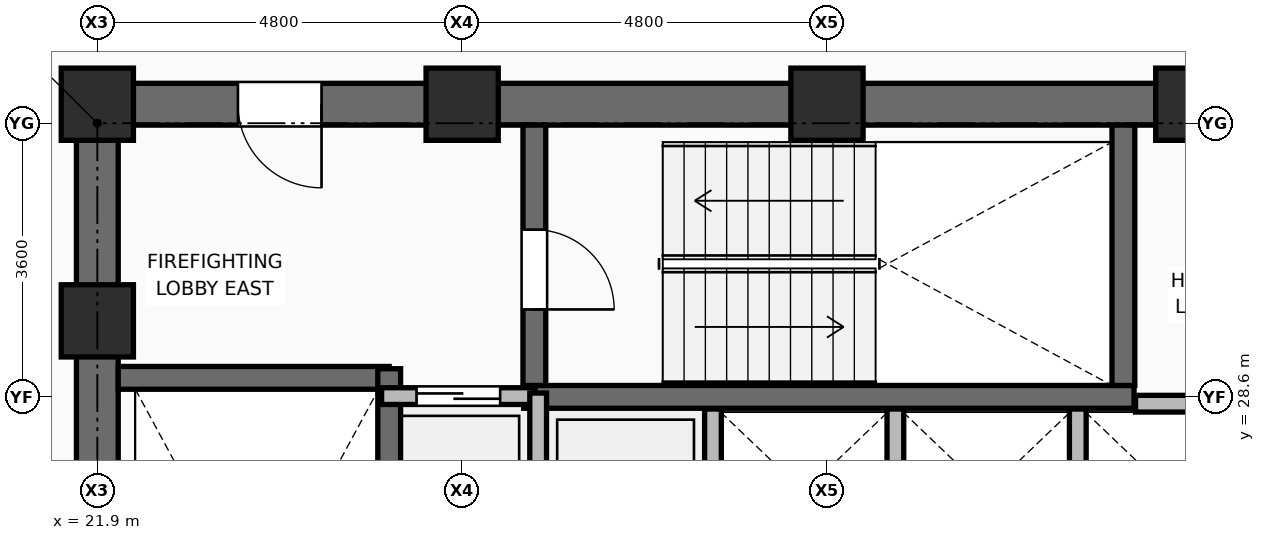
"""IFC4 building model, lengths in metres.
Left out: names, types, materials, properties, quantities, classifications, styles, units other than length and angle.
Written with IfcOpenShell. Run it as: python <this file> out.ifc"""

import sys

from ifc_helpers import new_model, si_unit, direction, frame, frame_2d, origin, origin_2d, place, context, subcontext, project, spatial, rectangle, extrude, element, fill, save


model = new_model("IFC4")
c1 = context("Model", 3, precision=1e-05, world=origin(), true_north=direction((0.0, 1.0)))
c2 = subcontext(c1, "Body", "Model", "MODEL_VIEW")
j1 = project(units=[si_unit("LENGTHUNIT", "METRE"), si_unit("PLANEANGLEUNIT", "RADIAN")], contexts=[c1])
p1 = place(None, origin())
s1 = spatial("IfcSite", under=j1, at=p1, CompositionType="ELEMENT")
p2 = place(p1, origin())
s2 = spatial("IfcBuilding", under=s1, at=p2, CompositionType="ELEMENT")
p3 = place(p2, frame((0.0, 0.0, 172.2)))
s3 = spatial("IfcBuildingStorey", under=s2, at=p3, CompositionType="ELEMENT", Elevation=172.2)
for number, where, z_axis, x_axis in (
    (1, (21.9, 29.6, 0.0), (0.0, 0.0, 1.0), (1.0, 0.0, 0.0)),
    (2, (21.9, 32.45, 0.0), (0.0, 0.0, 1.0), (1.0, 0.0, 0.0)),
    (3, (26.7, 32.45, 0.0), (0.0, 0.0, 1.0), (1.0, 0.0, 0.0)),
    (4, (31.5, 32.45, 0.0), (0.0, 0.0, 1.0), (1.0, 0.0, 0.0)),
    (5, (36.3, 32.45, 0.0), (0.0, 0.0, 1.0), (1.0, 0.0, 0.0)),
):
    element("IfcColumn", number, at=place(p3, frame(where, z_axis=z_axis, x_axis=x_axis)), inside=s3, PredefinedType="COLUMN", context=c2, shape_type="SweptSolid", body=[
        extrude(rectangle(XDim=0.95, YDim=0.95, at=origin_2d()), origin(), (0.0, 0.0, 1.0), 3.75),
    ])
p4 = place(p3, frame((30.0, 25.71, 0.0), z_axis=(0.0, 0.0, 1.0), x_axis=(0.0, 1.0, 0.0)))
e6 = element("IfcWall", 6, at=p4, inside=s3, PredefinedType="PARTITIONING", context=c2, shape_type="SweptSolid", body=[
    extrude(rectangle(XDim=2.73, YDim=0.22, at=frame_2d((1.365, 0.0))), origin(), (0.0, 0.0, 1.0), 3.475),
])
p5 = place(p3, frame((32.4, 26.2, 0.0), z_axis=(0.0, 0.0, 1.0), x_axis=(0.0, 1.0, 0.0)))
e7 = element("IfcWall", 7, at=p5, inside=s3, PredefinedType="PARTITIONING", context=c2, shape_type="SweptSolid", body=[
    extrude(rectangle(XDim=2.24, YDim=0.22, at=frame_2d((1.12, 0.0))), origin(), (0.0, 0.0, 1.0), 3.475),
])
p6 = place(p3, frame((34.8, 26.23, 0.0), z_axis=(0.0, 0.0, 1.0), x_axis=(0.0, 1.0, 0.0)))
e8 = element("IfcWall", 8, at=p6, inside=s3, PredefinedType="PARTITIONING", context=c2, shape_type="SweptSolid", body=[
    extrude(rectangle(XDim=2.21, YDim=0.22, at=frame_2d((1.105, 0.0))), origin(), (0.0, 0.0, 1.0), 3.475),
])
p7 = place(p3, frame((21.625, 32.45, 0.0), z_axis=(0.0, 0.0, 1.0), x_axis=(1.0, 0.0, 0.0)))
e9 = element("IfcWall", 9, at=p7, inside=s3, PredefinedType="SHEAR", context=c2, shape_type="SweptSolid", body=[
    extrude(rectangle(XDim=19.75, YDim=0.55, at=frame_2d((9.875, 0.0))), origin(), (0.0, 0.0, 1.0), 3.5),
])
p8 = place(p7, frame((2.125, 0.0, 0.0)))
e10 = element("IfcOpeningElement", 10, at=p8, cuts=e9, PredefinedType="OPENING", context=c2, shape_type="SweptSolid", body=[
    extrude(rectangle(XDim=1.1, YDim=2.1, at=frame_2d((0.55, 1.05))), frame((0.0, 0.285, 0.0), z_axis=(0.0, -1.0, 0.0), x_axis=(1.0, 0.0, 0.0)), (0.0, 0.0, 1.0), 0.57),
])
p9 = place(p7, frame((15.515, 0.0, 0.0)))
e11 = element("IfcOpeningElement", 11, at=p9, cuts=e9, PredefinedType="OPENING", context=c2, shape_type="SweptSolid", body=[
    extrude(rectangle(XDim=1.0, YDim=2.1, at=frame_2d((0.5, 1.05))), frame((0.0, 0.285, 0.0), z_axis=(0.0, -1.0, 0.0), x_axis=(1.0, 0.0, 0.0)), (0.0, 0.0, 1.0), 0.57),
])
p10 = place(p7, frame((17.525, 0.0, 0.0)))
e12 = element("IfcOpeningElement", 12, at=p10, cuts=e9, PredefinedType="OPENING", context=c2, shape_type="SweptSolid", body=[
    extrude(rectangle(XDim=0.9, YDim=2.1, at=frame_2d((0.45, 1.05))), frame((0.0, 0.285, 0.0), z_axis=(0.0, -1.0, 0.0), x_axis=(1.0, 0.0, 0.0)), (0.0, 0.0, 1.0), 0.57),
])
p11 = place(p3, frame((21.9, 18.075, 0.0), z_axis=(0.0, 0.0, 1.0), x_axis=(0.0, 1.0, 0.0)))
e13 = element("IfcWall", 13, at=p11, inside=s3, PredefinedType="SHEAR", context=c2, shape_type="SweptSolid", body=[
    extrude(rectangle(XDim=14.1, YDim=0.55, at=frame_2d((7.05, 0.0))), origin(), (0.0, 0.0, 1.0), 3.5),
])
p12 = place(p3, frame((22.175, 28.85, 0.0), z_axis=(0.0, 0.0, 1.0), x_axis=(1.0, 0.0, 0.0)))
e14 = element("IfcWall", 14, at=p12, inside=s3, PredefinedType="SHEAR", context=c2, shape_type="SweptSolid", body=[
    extrude(rectangle(XDim=3.565, YDim=0.3, at=frame_2d((1.782, 0.0))), origin(), (0.0, 0.0, 1.0), 3.5),
])
p13 = place(p3, frame((25.74, 20.98, 0.0), z_axis=(0.0, 0.0, 1.0), x_axis=(0.0, 1.0, 0.0)))
e15 = element("IfcWall", 15, at=p13, inside=s3, PredefinedType="SHEAR", context=c2, shape_type="SweptSolid", body=[
    extrude(rectangle(XDim=7.99, YDim=0.3, at=frame_2d((3.995, 0.0))), origin(), (0.0, 0.0, 1.0), 3.5),
])
p14 = place(p3, frame((27.51, 28.6, 0.0), z_axis=(0.0, 0.0, 1.0), x_axis=(1.0, 0.0, 0.0)))
e16 = element("IfcWall", 16, at=p14, inside=s3, PredefinedType="SHEAR", context=c2, shape_type="SweptSolid", body=[
    extrude(rectangle(XDim=8.03, YDim=0.3, at=frame_2d((4.015, 0.0))), origin(), (0.0, 0.0, 1.0), 3.5),
])
p15 = place(p3, frame((27.65, 28.75, 0.0), z_axis=(0.0, 0.0, 1.0), x_axis=(0.0, 1.0, 0.0)))
e17 = element("IfcWall", 17, at=p15, inside=s3, PredefinedType="SHEAR", context=c2, shape_type="SweptSolid", body=[
    extrude(rectangle(XDim=3.425, YDim=0.3, at=frame_2d((1.712, 0.0))), origin(), (0.0, 0.0, 1.0), 3.5),
])
p16 = place(p15, frame((1.0, 0.0, 0.0)))
e18 = element("IfcOpeningElement", 18, at=p16, cuts=e17, PredefinedType="OPENING", context=c2, shape_type="SweptSolid", body=[
    extrude(rectangle(XDim=1.05, YDim=2.1, at=frame_2d((0.525, 1.05))), frame((0.0, 0.16, 0.0), z_axis=(0.0, -1.0, 0.0), x_axis=(1.0, 0.0, 0.0)), (0.0, 0.0, 1.0), 0.32),
])
p17 = place(p3, frame((35.4, 28.75, 0.0), z_axis=(0.0, 0.0, 1.0), x_axis=(0.0, 1.0, 0.0)))
e19 = element("IfcWall", 19, at=p17, inside=s3, PredefinedType="SHEAR", context=c2, shape_type="SweptSolid", body=[
    extrude(rectangle(XDim=3.425, YDim=0.3, at=frame_2d((1.712, 0.0))), origin(), (0.0, 0.0, 1.0), 3.5),
])
p18 = place(p3, frame((25.64, 28.61, 0.0), z_axis=(0.0, 0.0, 1.0), x_axis=(1.0, 0.0, 0.0)))
e20 = element("IfcWall", 20, at=p18, inside=s3, PredefinedType="PARTITIONING", context=c2, shape_type="SweptSolid", body=[
    extrude(rectangle(XDim=2.02, YDim=0.22, at=frame_2d((1.01, 0.0))), origin(), (0.0, 0.0, 1.0), 3.48),
])
p19 = place(p18, frame((0.46, 0.0, 0.0)))
e21 = element("IfcOpeningElement", 21, at=p19, cuts=e20, PredefinedType="OPENING", context=c2, shape_type="SweptSolid", body=[
    extrude(rectangle(XDim=1.1, YDim=2.2, at=frame_2d((0.55, 1.1))), frame((0.0, 0.12, 0.0), z_axis=(0.0, -1.0, 0.0), x_axis=(1.0, 0.0, 0.0)), (0.0, 0.0, 1.0), 0.24),
])
p20 = place(p3, frame((35.56, 28.51, 0.0), z_axis=(0.0, 0.0, 1.0), x_axis=(1.0, 0.0, 0.0)))
e22 = element("IfcWall", 22, at=p20, inside=s3, PredefinedType="PARTITIONING", context=c2, shape_type="SweptSolid", body=[
    extrude(rectangle(XDim=1.6, YDim=0.22, at=frame_2d((0.8, 0.0))), origin(), (0.0, 0.0, 1.0), 3.48),
])
p21 = place(p3, frame((27.7, 25.65, 0.0), z_axis=(0.0, 0.0, 1.0), x_axis=(0.0, 1.0, 0.0)))
e23 = element("IfcWall", 23, at=p21, inside=s3, PredefinedType="PARTITIONING", context=c2, shape_type="SweptSolid", body=[
    extrude(rectangle(XDim=3.0, YDim=0.22, at=frame_2d((1.5, 0.0))), origin(), (0.0, 0.0, 1.0), 3.48),
])
p22 = place(p16, frame((1.05, 0.0, 0.0), z_axis=(0.0, 0.0, 1.0), x_axis=(-1.0, 0.0, 0.0)))
e24 = element("IfcDoor", 24, at=p22, inside=s3, OperationType="SINGLE_SWING_RIGHT", PredefinedType="DOOR", context=c2, shape_type="SweptSolid", body=[
    extrude(rectangle(XDim=1.05, YDim=2.1, at=frame_2d((0.525, 1.05))), frame((0.0, 0.025, 0.0), z_axis=(0.0, -1.0, 0.0), x_axis=(1.0, 0.0, 0.0)), (0.0, 0.0, 1.0), 0.05),
])
fill(e18, e24)
p23 = place(p19, origin())
e25 = element("IfcDoor", 25, at=p23, inside=s3, OperationType="DOUBLE_DOOR_SLIDING", PredefinedType="DOOR", context=c2, shape_type="SweptSolid", body=[
    extrude(rectangle(XDim=1.1, YDim=2.2, at=frame_2d((0.55, 1.1))), frame((0.0, 0.025, 0.0), z_axis=(0.0, -1.0, 0.0), x_axis=(1.0, 0.0, 0.0)), (0.0, 0.0, 1.0), 0.05),
])
fill(e21, e25)
p24 = place(p8, frame((1.1, 0.0, 0.0), z_axis=(0.0, 0.0, 1.0), x_axis=(-1.0, 0.0, 0.0)))
e26 = element("IfcDoor", 26, at=p24, inside=s3, OperationType="SINGLE_SWING_LEFT", PredefinedType="DOOR", context=c2, shape_type="SweptSolid", body=[
    extrude(rectangle(XDim=1.1, YDim=2.1, at=frame_2d((0.55, 1.05))), frame((0.0, 0.025, 0.0), z_axis=(0.0, -1.0, 0.0), x_axis=(1.0, 0.0, 0.0)), (0.0, 0.0, 1.0), 0.05),
])
fill(e10, e26)
save(model, sys.argv[1])
